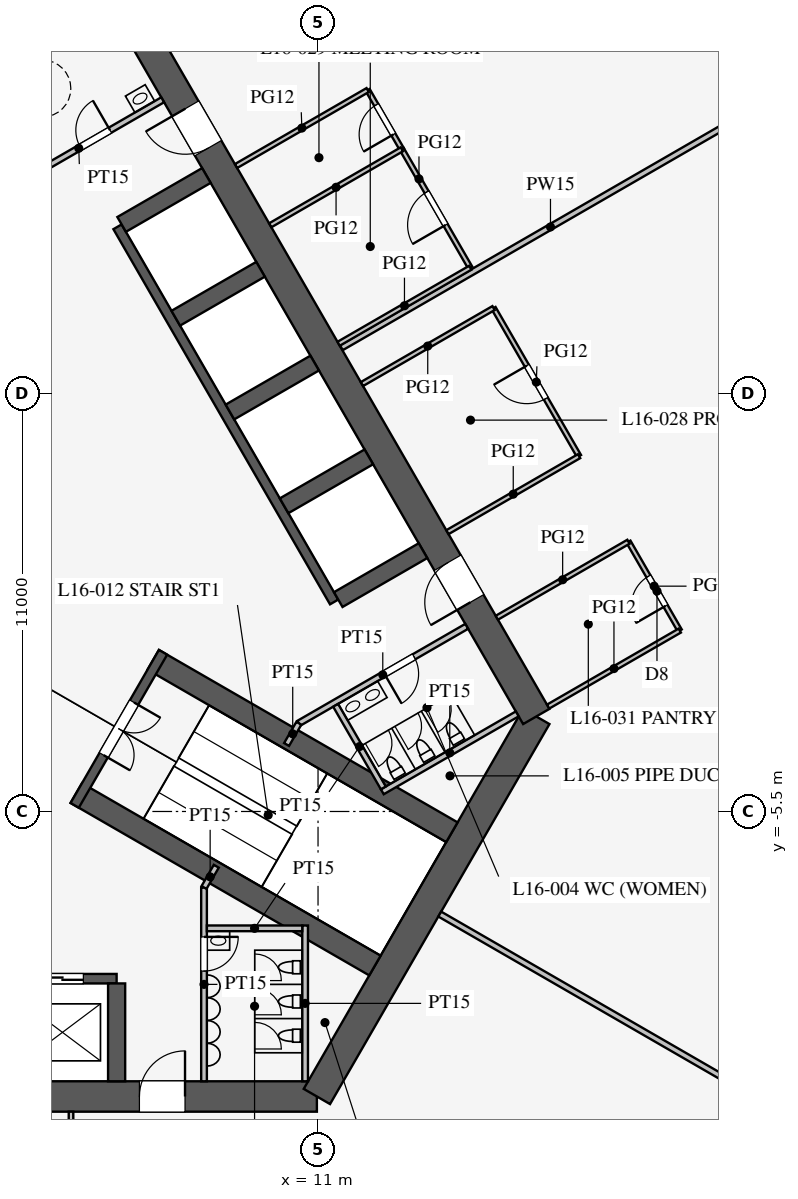
"""IFC4 building model, lengths in metres.
Left out: names, types, materials, properties, quantities, classifications, styles, units other than length and angle.
Written with IfcOpenShell. Run it as: python <this file> out.ifc"""

import sys

from ifc_helpers import new_model, si_unit, direction, frame, frame_2d, origin, place, context, subcontext, project, spatial, rectangle, extrude, element, fill, save


model = new_model("IFC4")
c1 = context("Model", 3, precision=1e-05, world=origin(), true_north=direction((0.0, 1.0)))
c2 = subcontext(c1, "Body", "Model", "MODEL_VIEW")
j1 = project(units=[si_unit("LENGTHUNIT", "METRE"), si_unit("PLANEANGLEUNIT", "RADIAN")], contexts=[c1])
p1 = place(None, origin())
s1 = spatial("IfcSite", under=j1, at=p1, CompositionType="ELEMENT")
p2 = place(p1, origin())
s2 = spatial("IfcBuilding", under=s1, at=p2, CompositionType="ELEMENT")
p3 = place(p2, frame((0.0, 0.0, 71.1)))
s3 = spatial("IfcBuildingStorey", under=s2, at=p3, CompositionType="ELEMENT", Elevation=71.1)
p4 = place(p3, frame((-10.97, -13.0, 0.0), z_axis=(0.0, 0.0, 1.0), x_axis=(1.0, 0.0, 0.0)))
e1 = element("IfcWall", 1, at=p4, inside=s3, PredefinedType="SHEAR", context=c2, shape_type="SweptSolid", body=[
    extrude(rectangle(XDim=21.939, YDim=0.8, at=frame_2d((10.97, 0.0))), origin(), (0.0, 0.0, 1.0), 4.2),
])
p5 = place(p4, frame((17.27, 0.0, 0.0)))
e2 = element("IfcOpeningElement", 2, at=p5, cuts=e1, PredefinedType="OPENING", context=c2, shape_type="SweptSolid", body=[
    extrude(rectangle(XDim=1.2, YDim=2.1, at=frame_2d((0.6, 1.05))), frame((0.0, 0.41, 0.0), z_axis=(0.0, -1.0, 0.0), x_axis=(1.0, 0.0, 0.0)), (0.0, 0.0, 1.0), 0.82),
])
p6 = place(p4, frame((3.47, 0.0, 0.0)))
e3 = element("IfcOpeningElement", 3, at=p6, cuts=e1, PredefinedType="OPENING", context=c2, shape_type="SweptSolid", body=[
    extrude(rectangle(XDim=1.2, YDim=2.1, at=frame_2d((0.6, 1.05))), frame((0.0, 0.41, 0.0), z_axis=(0.0, -1.0, 0.0), x_axis=(1.0, 0.0, 0.0)), (0.0, 0.0, 1.0), 0.82),
])
p7 = place(p3, frame((10.97, -13.0, 0.0), z_axis=(0.0, 0.0, 1.0), x_axis=(0.499995765644, 0.866027848477, 0.0)))
e4 = element("IfcWall", 4, at=p7, inside=s3, PredefinedType="SHEAR", context=c2, shape_type="SweptSolid", body=[
    extrude(rectangle(XDim=11.547, YDim=0.8, at=frame_2d((5.773, 0.0))), origin(), (0.0, 0.0, 1.0), 4.2),
])
p8 = place(p3, frame((16.743, -3.0, 0.0), z_axis=(0.0, 0.0, 1.0), x_axis=(-0.500002442456, 0.866023993627, 0.0)))
e5 = element("IfcWall", 5, at=p8, inside=s3, PredefinedType="SHEAR", context=c2, shape_type="SweptSolid", body=[
    extrude(rectangle(XDim=21.939, YDim=0.8, at=frame_2d((10.97, 0.0))), origin(), (0.0, 0.0, 1.0), 4.2),
])
p9 = place(p8, frame((17.27, 0.0, 0.0)))
e6 = element("IfcOpeningElement", 6, at=p9, cuts=e5, PredefinedType="OPENING", context=c2, shape_type="SweptSolid", body=[
    extrude(rectangle(XDim=1.2, YDim=2.1, at=frame_2d((0.6, 1.05))), frame((0.0, 0.41, 0.0), z_axis=(0.0, -1.0, 0.0), x_axis=(1.0, 0.0, 0.0)), (0.0, 0.0, 1.0), 0.82),
])
p10 = place(p8, frame((3.47, 0.0, 0.0)))
e7 = element("IfcOpeningElement", 7, at=p10, cuts=e5, PredefinedType="OPENING", context=c2, shape_type="SweptSolid", body=[
    extrude(rectangle(XDim=1.2, YDim=2.1, at=frame_2d((0.6, 1.05))), frame((0.0, 0.41, 0.0), z_axis=(0.0, -1.0, 0.0), x_axis=(1.0, 0.0, 0.0)), (0.0, 0.0, 1.0), 0.82),
])
p11 = place(p3, frame((-5.7, -9.9, 0.0), z_axis=(0.0, 0.0, 1.0), x_axis=(1.0, 0.0, 0.0)))
e8 = element("IfcWall", 8, at=p11, inside=s3, PredefinedType="SHEAR", context=c2, shape_type="SweptSolid", body=[
    extrude(rectangle(XDim=11.4, YDim=0.25, at=frame_2d((5.7, 0.0))), origin(), (0.0, 0.0, 1.0), 4.2),
])
p12 = place(p11, frame((0.875, 0.0, 0.0)))
e9 = element("IfcOpeningElement", 9, at=p12, cuts=e8, PredefinedType="OPENING", context=c2, shape_type="SweptSolid", body=[
    extrude(rectangle(XDim=1.1, YDim=2.2, at=frame_2d((0.55, 1.1))), frame((0.0, 0.135, 0.0), z_axis=(0.0, -1.0, 0.0), x_axis=(1.0, 0.0, 0.0)), (0.0, 0.0, 1.0), 0.27),
])
p13 = place(p11, frame((3.725, 0.0, 0.0)))
e10 = element("IfcOpeningElement", 10, at=p13, cuts=e8, PredefinedType="OPENING", context=c2, shape_type="SweptSolid", body=[
    extrude(rectangle(XDim=1.1, YDim=2.2, at=frame_2d((0.55, 1.1))), frame((0.0, 0.135, 0.0), z_axis=(0.0, -1.0, 0.0), x_axis=(1.0, 0.0, 0.0)), (0.0, 0.0, 1.0), 0.27),
])
p14 = place(p11, frame((6.575, 0.0, 0.0)))
e11 = element("IfcOpeningElement", 11, at=p14, cuts=e8, PredefinedType="OPENING", context=c2, shape_type="SweptSolid", body=[
    extrude(rectangle(XDim=1.1, YDim=2.2, at=frame_2d((0.55, 1.1))), frame((0.0, 0.135, 0.0), z_axis=(0.0, -1.0, 0.0), x_axis=(1.0, 0.0, 0.0)), (0.0, 0.0, 1.0), 0.27),
])
p15 = place(p11, frame((9.425, 0.0, 0.0)))
e12 = element("IfcOpeningElement", 12, at=p15, cuts=e8, PredefinedType="OPENING", context=c2, shape_type="SweptSolid", body=[
    extrude(rectangle(XDim=1.1, YDim=2.2, at=frame_2d((0.55, 1.1))), frame((0.0, 0.135, 0.0), z_axis=(0.0, -1.0, 0.0), x_axis=(1.0, 0.0, 0.0)), (0.0, 0.0, 1.0), 0.27),
])
p16 = place(p3, frame((5.7, -10.025, 0.0), z_axis=(0.0, 0.0, 1.0), x_axis=(0.0, -1.0, 0.0)))
e13 = element("IfcWall", 13, at=p16, inside=s3, PredefinedType="SHEAR", context=c2, shape_type="SweptSolid", body=[
    extrude(rectangle(XDim=2.575, YDim=0.45, at=frame_2d((1.288, 0.0))), origin(), (0.0, 0.0, 1.0), 4.2),
])
p17 = place(p3, frame((11.424, 0.014, 0.0), z_axis=(0.0, 0.0, 1.0), x_axis=(-0.500001763848, 0.866024385424, 0.0)))
e14 = element("IfcWall", 14, at=p17, inside=s3, PredefinedType="SHEAR", context=c2, shape_type="SweptSolid", body=[
    extrude(rectangle(XDim=11.4, YDim=0.25, at=frame_2d((5.7, 0.0))), origin(), (0.0, 0.0, 1.0), 4.2),
])
for number, where, z_axis, x_axis in (
    (15, (11.532, 0.076, 0.0), (0.0, 0.0, 1.0), (0.866, 0.5, 0.0)),
    (16, (10.107, 2.544, 0.0), (0.0, 0.0, 1.0), (0.866, 0.5, 0.0)),
    (17, (8.682, 5.012, 0.0), (0.0, 0.0, 1.0), (0.866, 0.5, 0.0)),
    (18, (7.257, 7.481, 0.0), (0.0, 0.0, 1.0), (0.866, 0.5, 0.0)),
):
    element("IfcWall", number, at=place(p3, frame(where, z_axis=z_axis, x_axis=x_axis)), inside=s3, PredefinedType="SHEAR", context=c2, shape_type="SweptSolid", body=[
        extrude(rectangle(XDim=2.575, YDim=0.45, at=frame_2d((1.288, 0.0))), origin(), (0.0, 0.0, 1.0), 4.2),
    ])
p18 = place(p3, frame((5.832, 9.949, 0.0), z_axis=(0.0, 0.0, 1.0), x_axis=(0.866029291668, 0.499993265928, 0.0)))
e19 = element("IfcWall", 19, at=p18, inside=s3, PredefinedType="SHEAR", context=c2, shape_type="SweptSolid", body=[
    extrude(rectangle(XDim=2.575, YDim=0.45, at=frame_2d((1.288, 0.0))), origin(), (0.0, 0.0, 1.0), 4.2),
])
for number, where, z_axis, x_axis in (
    (20, (4.638, -5.016, 0.0), (0.0, 0.0, 1.0), (0.866, -0.5, 0.0)),
    (21, (6.663, -1.509, 0.0), (0.0, 0.0, 1.0), (0.866, -0.5, 0.0)),
):
    element("IfcWall", number, at=place(p3, frame(where, z_axis=z_axis, x_axis=x_axis)), inside=s3, PredefinedType="SHEAR", context=c2, shape_type="SweptSolid", body=[
        extrude(rectangle(XDim=9.075, YDim=0.6, at=frame_2d((4.538, 0.0))), origin(), (0.0, 0.0, 1.0), 4.2),
    ])
p19 = place(p3, frame((4.597, -5.339, 0.0), z_axis=(0.0, 0.0, 1.0), x_axis=(0.499984536904, 0.866034331223, 0.0)))
e22 = element("IfcWall", 22, at=p19, inside=s3, PredefinedType="SHEAR", context=c2, shape_type="SweptSolid", body=[
    extrude(rectangle(XDim=4.65, YDim=0.25, at=frame_2d((2.325, 0.0))), origin(), (0.0, 0.0, 1.0), 4.2),
])
p20 = place(p19, frame((1.525, 0.0, 0.0)))
e23 = element("IfcOpeningElement", 23, at=p20, cuts=e22, PredefinedType="OPENING", context=c2, shape_type="SweptSolid", body=[
    extrude(rectangle(XDim=1.6, YDim=2.1, at=frame_2d((0.8, 1.05))), frame((0.0, 0.135, 0.0), z_axis=(0.0, -1.0, 0.0), x_axis=(1.0, 0.0, 0.0)), (0.0, 0.0, 1.0), 0.27),
])
p21 = place(p3, frame((8.0, -7.5, 0.0), z_axis=(0.0, 0.0, 1.0), x_axis=(0.0, -1.0, 0.0)))
e24 = element("IfcWall", 24, at=p21, inside=s3, PredefinedType="PARTITIONING", context=c2, shape_type="SweptSolid", body=[
    extrude(rectangle(XDim=5.1, YDim=0.15, at=frame_2d((2.55, 0.0))), origin(), (0.0, 0.0, 1.0), 4.0),
])
p22 = place(p21, frame((1.3, 0.0, 0.0)))
e25 = element("IfcOpeningElement", 25, at=p22, cuts=e24, PredefinedType="OPENING", context=c2, shape_type="SweptSolid", body=[
    extrude(rectangle(XDim=0.9, YDim=2.1, at=frame_2d((0.45, 1.05))), frame((0.0, 0.085, 0.0), z_axis=(0.0, -1.0, 0.0), x_axis=(1.0, 0.0, 0.0)), (0.0, 0.0, 1.0), 0.17),
])
p23 = place(p3, frame((2.495, 10.678, 0.0), z_axis=(0.0, 0.0, 1.0), x_axis=(0.86602216432, 0.500005610874, 0.0)))
e26 = element("IfcWall", 26, at=p23, inside=s3, PredefinedType="PARTITIONING", context=c2, shape_type="SweptSolid", body=[
    extrude(rectangle(XDim=5.1, YDim=0.15, at=frame_2d((2.55, 0.0))), origin(), (0.0, 0.0, 1.0), 4.0),
])
p24 = place(p23, frame((2.6, 0.0, 0.0)))
e27 = element("IfcOpeningElement", 27, at=p24, cuts=e26, PredefinedType="OPENING", context=c2, shape_type="SweptSolid", body=[
    extrude(rectangle(XDim=0.9, YDim=2.1, at=frame_2d((0.45, 1.05))), frame((0.0, 0.085, 0.0), z_axis=(0.0, -1.0, 0.0), x_axis=(1.0, 0.0, 0.0)), (0.0, 0.0, 1.0), 0.17),
])
p25 = place(p3, frame((10.495, -3.178, 0.0), z_axis=(0.0, 0.0, 1.0), x_axis=(0.86602216432, 0.500005610874, 0.0)))
e28 = element("IfcWall", 28, at=p25, inside=s3, PredefinedType="PARTITIONING", context=c2, shape_type="SweptSolid", body=[
    extrude(rectangle(XDim=5.1, YDim=0.15, at=frame_2d((2.55, 0.0))), origin(), (0.0, 0.0, 1.0), 4.0),
])
p26 = place(p25, frame((2.6, 0.0, 0.0)))
e29 = element("IfcOpeningElement", 29, at=p26, cuts=e28, PredefinedType="OPENING", context=c2, shape_type="SweptSolid", body=[
    extrude(rectangle(XDim=0.9, YDim=2.1, at=frame_2d((0.45, 1.05))), frame((0.0, 0.085, 0.0), z_axis=(0.0, -1.0, 0.0), x_axis=(1.0, 0.0, 0.0)), (0.0, 0.0, 1.0), 0.17),
])
for number, where, z_axis, x_axis in (
    (30, (8.0, -7.5, 0.0), (0.0, 0.0, 1.0), (0.5, 0.866, 0.0)),
    (31, (10.495, -3.178, 0.0), (0.0, 0.0, 1.0), (-0.5, -0.866, 0.0)),
):
    element("IfcWall", number, at=place(p3, frame(where, z_axis=z_axis, x_axis=x_axis)), inside=s3, PredefinedType="PARTITIONING", context=c2, shape_type="SweptSolid", body=[
        extrude(rectangle(XDim=0.645, YDim=0.15, at=frame_2d((0.323, 0.0))), origin(), (0.0, 0.0, 1.0), 4.0),
    ])
p27 = place(p3, frame((10.66, -8.5, 0.0), z_axis=(0.0, 0.0, 1.0), x_axis=(0.0, -1.0, 0.0)))
e32 = element("IfcWall", 32, at=p27, inside=s3, PredefinedType="PARTITIONING", context=c2, shape_type="SweptSolid", body=[
    extrude(rectangle(XDim=4.1, YDim=0.15, at=frame_2d((2.05, 0.0))), origin(), (0.0, 0.0, 1.0), 4.0),
])
p28 = place(p3, frame((8.075, -8.575, 0.0), z_axis=(0.0, 0.0, 1.0), x_axis=(1.0, 0.0, 0.0)))
e33 = element("IfcWall", 33, at=p28, inside=s3, PredefinedType="PARTITIONING", context=c2, shape_type="SweptSolid", body=[
    extrude(rectangle(XDim=2.51, YDim=0.15, at=frame_2d((1.255, 0.0))), origin(), (0.0, 0.0, 1.0), 4.0),
])
p29 = place(p3, frame((12.691, -4.982, 0.0), z_axis=(0.0, 0.0, 1.0), x_axis=(0.8660249478, 0.500000789788, 0.0)))
e34 = element("IfcWall", 34, at=p29, inside=s3, PredefinedType="PARTITIONING", context=c2, shape_type="SweptSolid", body=[
    extrude(rectangle(XDim=4.1, YDim=0.15, at=frame_2d((2.05, 0.0))), origin(), (0.0, 0.0, 1.0), 4.0),
])
p30 = place(p3, frame((11.464, -2.706, 0.0), z_axis=(0.0, 0.0, 1.0), x_axis=(0.50001992892, -0.866013897511, 0.0)))
e35 = element("IfcWall", 35, at=p30, inside=s3, PredefinedType="PARTITIONING", context=c2, shape_type="SweptSolid", body=[
    extrude(rectangle(XDim=2.51, YDim=0.15, at=frame_2d((1.255, 0.0))), origin(), (0.0, 0.0, 1.0), 4.0),
])
p31 = place(p3, frame((14.203, -8.2, 0.0), z_axis=(0.0, 0.0, 1.0), x_axis=(0.866024965723, -0.500000758745, 0.0)))
e36 = element("IfcWall", 36, at=p31, inside=s3, PredefinedType="PARTITIONING", context=c2, shape_type="SweptSolid", body=[
    extrude(rectangle(XDim=18.25, YDim=0.15, at=frame_2d((9.125, 0.0))), origin(), (0.0, 0.0, 1.0), 2.3),
])
p32 = place(p3, frame((4.5, -13.4, 0.0), z_axis=(0.0, 0.0, 1.0), x_axis=(0.0, -1.0, 0.0)))
e37 = element("IfcWall", 37, at=p32, inside=s3, PredefinedType="PARTITIONING", context=c2, shape_type="SweptSolid", body=[
    extrude(rectangle(XDim=4.0, YDim=0.12, at=frame_2d((2.0, 0.0))), origin(), (0.0, 0.0, 1.0), 2.8),
])
p33 = place(p3, frame((11.613, 6.705, 0.0), z_axis=(0.0, 0.0, 1.0), x_axis=(0.866029791586, 0.499992400027, 0.0)))
e38 = element("IfcWall", 38, at=p33, inside=s3, PredefinedType="PARTITIONING", context=c2, shape_type="SweptSolid", body=[
    extrude(rectangle(XDim=12.709, YDim=0.15, at=frame_2d((6.354, 0.0))), origin(), (0.0, 0.0, 1.0), 2.8),
])
p34 = place(p3, frame((15.006, 8.808, 0.0), z_axis=(0.0, 0.0, 1.0), x_axis=(-0.500012057535, 0.866018442252, 0.0)))
e39 = element("IfcWall", 39, at=p34, inside=s3, PredefinedType="PARTITIONING", context=c2, shape_type="SweptSolid", body=[
    extrude(rectangle(XDim=3.6, YDim=0.12, at=frame_2d((1.8, 0.0))), origin(), (0.0, 0.0, 1.0), 2.9),
])
p35 = place(p34, frame((1.3, 0.0, 0.15)))
e40 = element("IfcOpeningElement", 40, at=p35, cuts=e39, PredefinedType="OPENING", context=c2, shape_type="SweptSolid", body=[
    extrude(rectangle(XDim=1.0, YDim=2.1, at=frame_2d((0.5, 1.05))), frame((0.0, 0.07, 0.0), z_axis=(0.0, -1.0, 0.0), x_axis=(1.0, 0.0, 0.0)), (0.0, 0.0, 1.0), 0.14),
])
p36 = place(p3, frame((13.206, 11.926, 0.0), z_axis=(0.0, 0.0, 1.0), x_axis=(-0.499961193289, 0.866047807691, 0.0)))
e41 = element("IfcWall", 41, at=p36, inside=s3, PredefinedType="PARTITIONING", context=c2, shape_type="SweptSolid", body=[
    extrude(rectangle(XDim=1.8, YDim=0.12, at=frame_2d((0.9, 0.0))), origin(), (0.0, 0.0, 1.0), 2.9),
])
p37 = place(p36, frame((0.45, 0.0, 0.15)))
e42 = element("IfcOpeningElement", 42, at=p37, cuts=e41, PredefinedType="OPENING", context=c2, shape_type="SweptSolid", body=[
    extrude(rectangle(XDim=0.9, YDim=2.1, at=frame_2d((0.45, 1.05))), frame((0.0, 0.07, 0.0), z_axis=(0.0, -1.0, 0.0), x_axis=(1.0, 0.0, 0.0)), (0.0, 0.0, 1.0), 0.14),
])
p38 = place(p3, frame((20.519, -0.74, 0.0), z_axis=(0.0, 0.0, 1.0), x_axis=(-0.4999416173, 0.866059108428, 0.0)))
e43 = element("IfcWall", 43, at=p38, inside=s3, PredefinedType="PARTITIONING", context=c2, shape_type="SweptSolid", body=[
    extrude(rectangle(XDim=2.7, YDim=0.12, at=frame_2d((1.35, 0.0))), origin(), (0.0, 0.0, 1.0), 2.9),
])
p39 = place(p38, frame((0.75, 0.0, 0.15)))
e44 = element("IfcOpeningElement", 44, at=p39, cuts=e43, PredefinedType="OPENING", context=c2, shape_type="SweptSolid", body=[
    extrude(rectangle(XDim=0.9, YDim=2.1, at=frame_2d((0.45, 1.05))), frame((0.0, 0.07, 0.0), z_axis=(0.0, -1.0, 0.0), x_axis=(1.0, 0.0, 0.0)), (0.0, 0.0, 1.0), 0.14),
])
p40 = place(p3, frame((17.869, 3.85, 0.0), z_axis=(0.0, 0.0, 1.0), x_axis=(-0.500013631625, 0.866017533419, 0.0)))
e45 = element("IfcWall", 45, at=p40, inside=s3, PredefinedType="PARTITIONING", context=c2, shape_type="SweptSolid", body=[
    extrude(rectangle(XDim=4.5, YDim=0.12, at=frame_2d((2.25, 0.0))), origin(), (0.0, 0.0, 1.0), 2.9),
])
p41 = place(p40, frame((1.75, 0.0, 0.15)))
e46 = element("IfcOpeningElement", 46, at=p41, cuts=e45, PredefinedType="OPENING", context=c2, shape_type="SweptSolid", body=[
    extrude(rectangle(XDim=1.0, YDim=2.1, at=frame_2d((0.5, 1.05))), frame((0.0, 0.07, 0.0), z_axis=(0.0, -1.0, 0.0), x_axis=(1.0, 0.0, 0.0)), (0.0, 0.0, 1.0), 0.14),
])
p42 = place(p3, frame((11.542, 6.808, 0.0), z_axis=(0.0, 0.0, 1.0), x_axis=(0.866026010844, 0.49999894854, 0.0)))
e47 = element("IfcWall", 47, at=p42, inside=s3, PredefinedType="PARTITIONING", context=c2, shape_type="SweptSolid", body=[
    extrude(rectangle(XDim=4.0, YDim=0.12, at=frame_2d((2.0, 0.0))), origin(), (0.0, 0.0, 1.0), 2.8),
])
for number, where, z_axis, x_axis in (
    (48, (9.742, 9.926, 0.0), (0.0, 0.0, 1.0), (0.866, 0.5, 0.0)),
    (49, (8.842, 11.485, 0.0), (0.0, 0.0, 1.0), (0.866, 0.5, 0.0)),
    (50, (12.155, 5.747, 0.0), (0.0, 0.0, 1.0), (0.866, 0.5, 0.0)),
    (51, (17.055, -2.74, 0.0), (0.0, 0.0, 1.0), (0.866, 0.5, 0.0)),
    (52, (14.405, 1.85, 0.0), (0.0, 0.0, 1.0), (0.866, 0.5, 0.0)),
    (53, (15.705, -0.401, 0.0), (0.0, 0.0, 1.0), (0.866, 0.5, 0.0)),
):
    element("IfcWall", number, at=place(p3, frame(where, z_axis=z_axis, x_axis=x_axis)), inside=s3, PredefinedType="PARTITIONING", context=c2, shape_type="SweptSolid", body=[
        extrude(rectangle(XDim=4.0, YDim=0.12, at=frame_2d((2.0, 0.0))), origin(), (0.0, 0.0, 1.0), 2.9),
    ])
p43 = place(p22, origin())
e54 = element("IfcDoor", 54, at=p43, inside=s3, OperationType="SINGLE_SWING_LEFT", PredefinedType="DOOR", context=c2, shape_type="SweptSolid", body=[
    extrude(rectangle(XDim=0.9, YDim=2.1, at=frame_2d((0.45, 1.05))), frame((0.0, 0.025, 0.0), z_axis=(0.0, -1.0, 0.0), x_axis=(1.0, 0.0, 0.0)), (0.0, 0.0, 1.0), 0.05),
])
fill(e25, e54)
p44 = place(p24, origin())
e55 = element("IfcDoor", 55, at=p44, inside=s3, OperationType="SINGLE_SWING_RIGHT", PredefinedType="DOOR", context=c2, shape_type="SweptSolid", body=[
    extrude(rectangle(XDim=0.9, YDim=2.1, at=frame_2d((0.45, 1.05))), frame((0.0, 0.025, 0.0), z_axis=(0.0, -1.0, 0.0), x_axis=(1.0, 0.0, 0.0)), (0.0, 0.0, 1.0), 0.05),
])
fill(e27, e55)
p45 = place(p26, frame((0.9, 0.0, 0.0), z_axis=(0.0, 0.0, 1.0), x_axis=(-1.0, 0.0, 0.0)))
e56 = element("IfcDoor", 56, at=p45, inside=s3, OperationType="SINGLE_SWING_RIGHT", PredefinedType="DOOR", context=c2, shape_type="SweptSolid", body=[
    extrude(rectangle(XDim=0.9, YDim=2.1, at=frame_2d((0.45, 1.05))), frame((0.0, 0.025, 0.0), z_axis=(0.0, -1.0, 0.0), x_axis=(1.0, 0.0, 0.0)), (0.0, 0.0, 1.0), 0.05),
])
fill(e29, e56)
p46 = place(p20, frame((1.6, 0.0, 0.0), z_axis=(0.0, 0.0, 1.0), x_axis=(-1.0, 0.0, 0.0)))
e57 = element("IfcDoor", 57, at=p46, inside=s3, OperationType="DOUBLE_DOOR_SINGLE_SWING", PredefinedType="DOOR", context=c2, shape_type="SweptSolid", body=[
    extrude(rectangle(XDim=1.6, YDim=2.1, at=frame_2d((0.8, 1.05))), frame((0.0, 0.025, 0.0), z_axis=(0.0, -1.0, 0.0), x_axis=(1.0, 0.0, 0.0)), (0.0, 0.0, 1.0), 0.05),
])
fill(e23, e57)
p47 = place(p5, origin())
e58 = element("IfcDoor", 58, at=p47, inside=s3, OperationType="SINGLE_SWING_RIGHT", PredefinedType="DOOR", context=c2, shape_type="SweptSolid", body=[
    extrude(rectangle(XDim=1.2, YDim=2.1, at=frame_2d((0.6, 1.05))), frame((0.0, 0.025, 0.0), z_axis=(0.0, -1.0, 0.0), x_axis=(1.0, 0.0, 0.0)), (0.0, 0.0, 1.0), 0.05),
])
fill(e2, e58)
p48 = place(p9, origin())
e59 = element("IfcDoor", 59, at=p48, inside=s3, OperationType="SINGLE_SWING_RIGHT", PredefinedType="DOOR", context=c2, shape_type="SweptSolid", body=[
    extrude(rectangle(XDim=1.2, YDim=2.1, at=frame_2d((0.6, 1.05))), frame((0.0, 0.025, 0.0), z_axis=(0.0, -1.0, 0.0), x_axis=(1.0, 0.0, 0.0)), (0.0, 0.0, 1.0), 0.05),
])
fill(e6, e59)
p49 = place(p10, origin())
e60 = element("IfcDoor", 60, at=p49, inside=s3, OperationType="SINGLE_SWING_LEFT", PredefinedType="DOOR", context=c2, shape_type="SweptSolid", body=[
    extrude(rectangle(XDim=1.2, YDim=2.1, at=frame_2d((0.6, 1.05))), frame((0.0, 0.025, 0.0), z_axis=(0.0, -1.0, 0.0), x_axis=(1.0, 0.0, 0.0)), (0.0, 0.0, 1.0), 0.05),
])
fill(e7, e60)
p50 = place(p41, origin())
e61 = element("IfcDoor", 61, at=p50, inside=s3, OperationType="SINGLE_SWING_RIGHT", PredefinedType="DOOR", context=c2, shape_type="SweptSolid", body=[
    extrude(rectangle(XDim=1.0, YDim=2.1, at=frame_2d((0.5, 1.05))), frame((0.0, 0.025, 0.0), z_axis=(0.0, -1.0, 0.0), x_axis=(1.0, 0.0, 0.0)), (0.0, 0.0, 1.0), 0.05),
])
fill(e46, e61)
p51 = place(p35, origin())
e62 = element("IfcDoor", 62, at=p51, inside=s3, OperationType="SINGLE_SWING_LEFT", PredefinedType="DOOR", context=c2, shape_type="SweptSolid", body=[
    extrude(rectangle(XDim=1.0, YDim=2.1, at=frame_2d((0.5, 1.05))), frame((0.0, 0.025, 0.0), z_axis=(0.0, -1.0, 0.0), x_axis=(1.0, 0.0, 0.0)), (0.0, 0.0, 1.0), 0.05),
])
fill(e40, e62)
p52 = place(p37, origin())
e63 = element("IfcDoor", 63, at=p52, inside=s3, OperationType="SINGLE_SWING_LEFT", PredefinedType="DOOR", context=c2, shape_type="SweptSolid", body=[
    extrude(rectangle(XDim=0.9, YDim=2.1, at=frame_2d((0.45, 1.05))), frame((0.0, 0.025, 0.0), z_axis=(0.0, -1.0, 0.0), x_axis=(1.0, 0.0, 0.0)), (0.0, 0.0, 1.0), 0.05),
])
fill(e42, e63)
p53 = place(p39, origin())
e64 = element("IfcDoor", 64, at=p53, inside=s3, OperationType="SINGLE_SWING_LEFT", PredefinedType="DOOR", context=c2, shape_type="SweptSolid", body=[
    extrude(rectangle(XDim=0.9, YDim=2.1, at=frame_2d((0.45, 1.05))), frame((0.0, 0.025, 0.0), z_axis=(0.0, -1.0, 0.0), x_axis=(1.0, 0.0, 0.0)), (0.0, 0.0, 1.0), 0.05),
])
fill(e44, e64)
p54 = place(p15, origin())
e65 = element("IfcDoor", 65, at=p54, inside=s3, OperationType="DOUBLE_DOOR_SLIDING", PredefinedType="DOOR", context=c2, shape_type="SweptSolid", body=[
    extrude(rectangle(XDim=1.1, YDim=2.2, at=frame_2d((0.55, 1.1))), frame((0.0, 0.025, 0.0), z_axis=(0.0, -1.0, 0.0), x_axis=(1.0, 0.0, 0.0)), (0.0, 0.0, 1.0), 0.05),
])
fill(e12, e65)
save(model, sys.argv[1])
